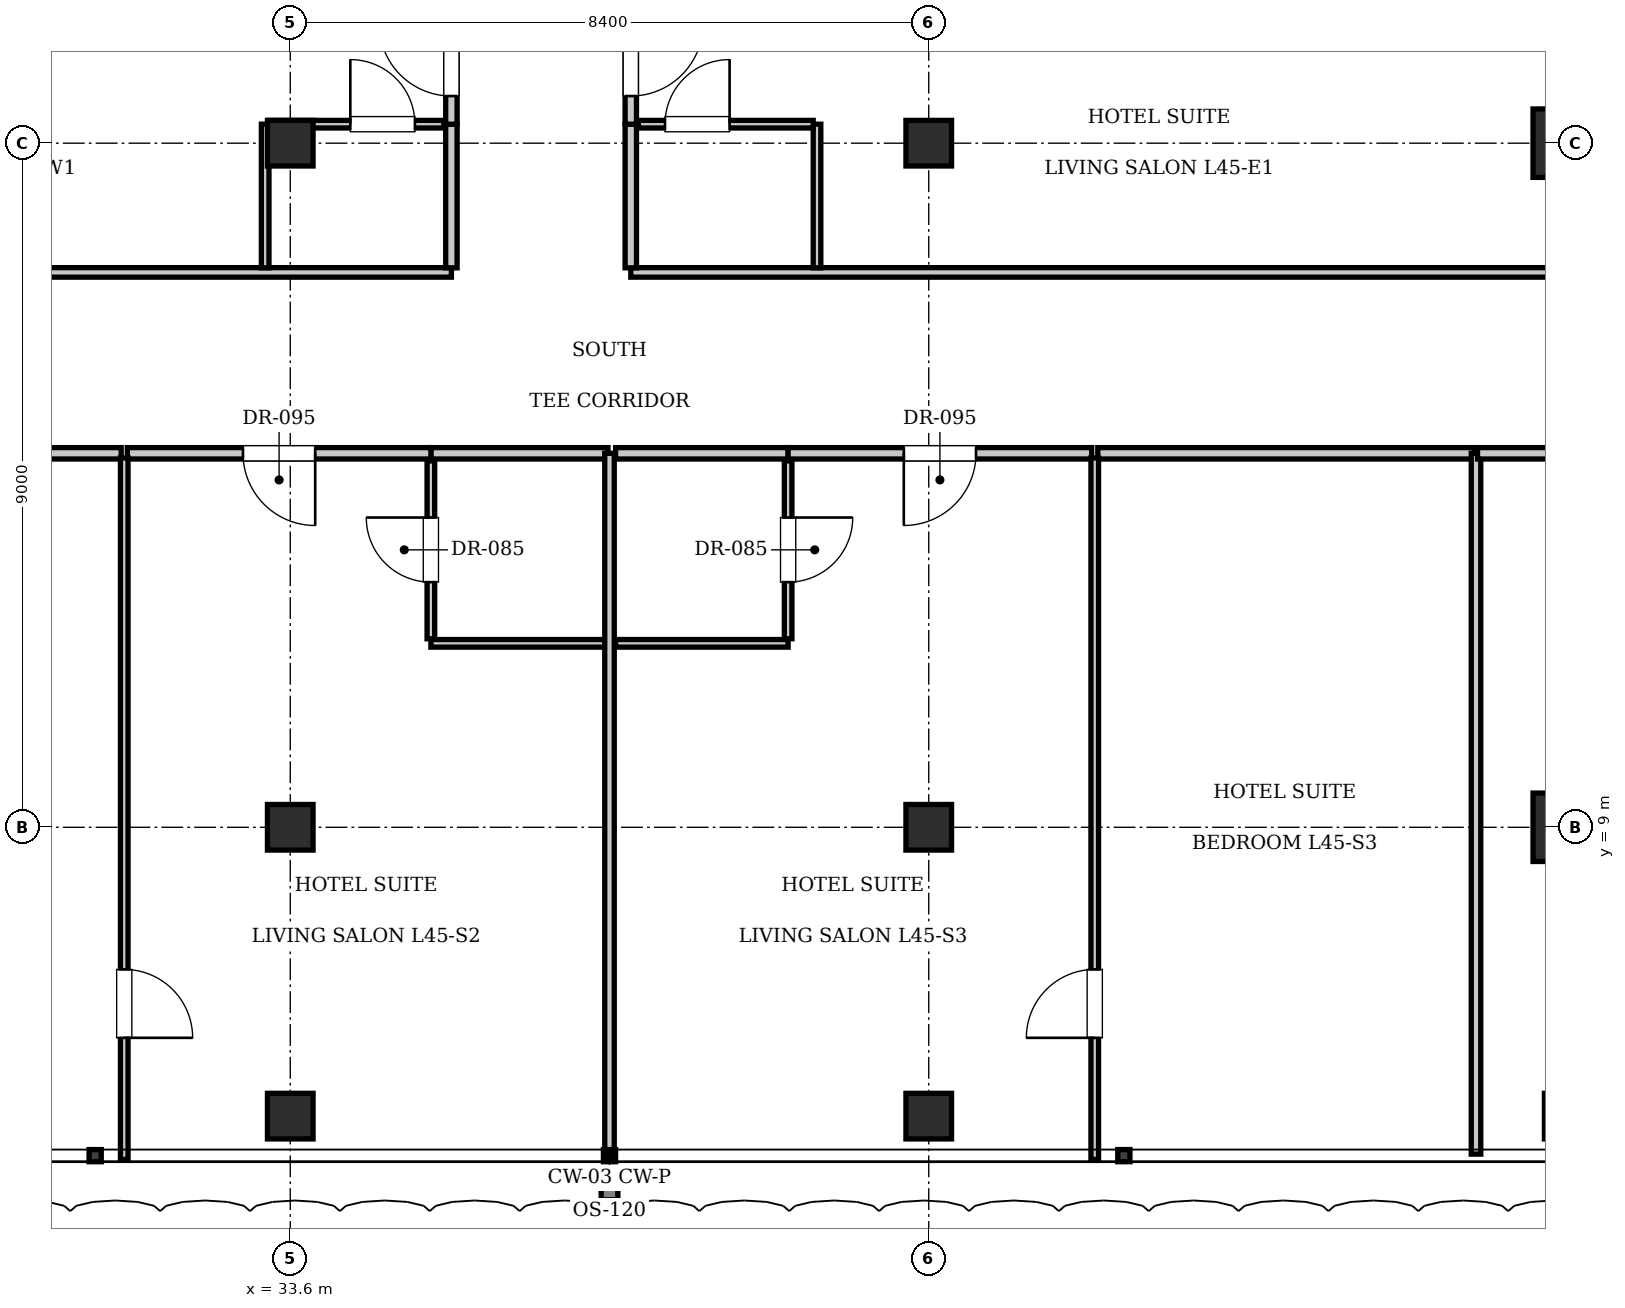
"""IFC4 building model, lengths in metres.
Left out: names, types, materials, properties, quantities, classifications, styles, units other than length and angle.
Written with IfcOpenShell. Run it as: python <this file> out.ifc"""

import sys

from ifc_helpers import new_model, si_unit, direction, frame, frame_2d, origin, origin_2d, place, context, subcontext, project, spatial, rectangle, i_section, extrude, element, fill, save


model = new_model("IFC4")
c1 = context("Model", 3, precision=1e-05, world=origin(), true_north=direction((0.0, 1.0)))
c2 = subcontext(c1, "Body", "Model", "MODEL_VIEW")
j1 = project(units=[si_unit("LENGTHUNIT", "METRE"), si_unit("PLANEANGLEUNIT", "RADIAN")], contexts=[c1])
p1 = place(None, origin())
s1 = spatial("IfcSite", under=j1, at=p1, CompositionType="ELEMENT")
p2 = place(p1, origin())
s2 = spatial("IfcBuilding", under=s1, at=p2, CompositionType="ELEMENT")
p3 = place(p2, frame((0.0, 0.0, 185.15)))
s3 = spatial("IfcBuildingStorey", under=s2, at=p3, CompositionType="ELEMENT", Elevation=185.15)
for number, where, z_axis, x_axis in (
    (1, (50.4, 18.0, 0.0), (0.0, 0.0, 1.0), (1.0, 0.0, 0.0)),
    (2, (50.4, 9.0, 0.0), (0.0, 0.0, 1.0), (1.0, 0.0, 0.0)),
):
    element("IfcColumn", number, at=place(p3, frame(where, z_axis=z_axis, x_axis=x_axis)), inside=s3, PredefinedType="COLUMN", context=c2, shape_type="SweptSolid", body=[
        extrude(rectangle(XDim=0.9, YDim=0.9, at=origin_2d()), origin(), (0.0, 0.0, 1.0), 3.85),
    ])
for number, where, z_axis, x_axis in (
    (3, (33.6, 9.0, 0.0), (0.0, 0.0, 1.0), (1.0, 0.0, 0.0)),
    (4, (42.0, 9.0, 0.0), (0.0, 0.0, 1.0), (1.0, 0.0, 0.0)),
    (5, (33.6, 18.0, 0.0), (0.0, 0.0, 1.0), (1.0, 0.0, 0.0)),
    (6, (42.0, 18.0, 0.0), (0.0, 0.0, 1.0), (1.0, 0.0, 0.0)),
    (7, (33.6, 5.2, 0.0), (0.0, 0.0, 1.0), (1.0, 0.0, 0.0)),
    (8, (42.0, 5.2, 0.0), (0.0, 0.0, 1.0), (1.0, 0.0, 0.0)),
    (9, (50.4, 5.2, 0.0), (0.0, 0.0, 1.0), (1.0, 0.0, 0.0)),
):
    element("IfcColumn", number, at=place(p3, frame(where, z_axis=z_axis, x_axis=x_axis)), inside=s3, PredefinedType="COLUMN", context=c2, shape_type="SweptSolid", body=[
        extrude(i_section(OverallWidth=0.6, OverallDepth=0.6, WebThickness=0.025, FlangeThickness=0.038, at=origin_2d()), origin(), (0.0, 0.0, 1.0), 3.85),
    ])
p4 = place(p3, frame((35.45, 13.92, 0.0), z_axis=(0.0, 0.0, 1.0), x_axis=(1.0, 0.0, 0.0)))
e10 = element("IfcWall", 10, at=p4, inside=s3, PredefinedType="PARTITIONING", context=c2, shape_type="SweptSolid", body=[
    extrude(rectangle(XDim=2.33, YDim=0.15, at=frame_2d((1.165, 0.0))), origin(), (0.0, 0.0, 1.0), 3.61),
])
p5 = place(p3, frame((35.45, 11.42, 0.0), z_axis=(0.0, 0.0, 1.0), x_axis=(1.0, 0.0, 0.0)))
e11 = element("IfcWall", 11, at=p5, inside=s3, PredefinedType="PARTITIONING", context=c2, shape_type="SweptSolid", body=[
    extrude(rectangle(XDim=2.31, YDim=0.1, at=frame_2d((1.155, 0.0))), origin(), (0.0, 0.0, 1.0), 3.61),
])
p6 = place(p3, frame((35.45, 11.48, 0.0), z_axis=(0.0, 0.0, 1.0), x_axis=(0.0, 1.0, 0.0)))
e12 = element("IfcWall", 12, at=p6, inside=s3, PredefinedType="PARTITIONING", context=c2, shape_type="SweptSolid", body=[
    extrude(rectangle(XDim=2.34, YDim=0.1, at=frame_2d((1.17, 0.0))), origin(), (0.0, 0.0, 1.0), 3.61),
])
p7 = place(p6, frame((0.745, 0.0, 0.0)))
e13 = element("IfcOpeningElement", 13, at=p7, cuts=e12, PredefinedType="OPENING", context=c2, shape_type="SweptSolid", body=[
    extrude(rectangle(XDim=0.85, YDim=2.1, at=frame_2d((0.425, 1.05))), frame((0.0, 0.06, 0.0), z_axis=(0.0, -1.0, 0.0), x_axis=(1.0, 0.0, 0.0)), (0.0, 0.0, 1.0), 0.12),
])
p8 = place(p3, frame((26.42, 13.92, 0.0), z_axis=(0.0, 0.0, 1.0), x_axis=(1.0, 0.0, 0.0)))
e14 = element("IfcWall", 14, at=p8, inside=s3, PredefinedType="PARTITIONING", context=c2, shape_type="SweptSolid", body=[
    extrude(rectangle(XDim=4.956, YDim=0.15, at=frame_2d((2.478, 0.0))), origin(), (0.0, 0.0, 1.0), 3.61),
])
p9 = place(p3, frame((31.456, 13.92, 0.0), z_axis=(0.0, 0.0, 1.0), x_axis=(1.0, 0.0, 0.0)))
e15 = element("IfcWall", 15, at=p9, inside=s3, PredefinedType="PARTITIONING", context=c2, shape_type="SweptSolid", body=[
    extrude(rectangle(XDim=3.994, YDim=0.15, at=frame_2d((1.997, 0.0))), origin(), (0.0, 0.0, 1.0), 3.61),
])
p10 = place(p9, frame((1.522, 0.0, 0.0)))
e16 = element("IfcOpeningElement", 16, at=p10, cuts=e15, PredefinedType="OPENING", context=c2, shape_type="SweptSolid", body=[
    extrude(rectangle(XDim=0.95, YDim=2.15, at=frame_2d((0.475, 1.075))), frame((0.0, 0.085, 0.0), z_axis=(0.0, -1.0, 0.0), x_axis=(1.0, 0.0, 0.0)), (0.0, 0.0, 1.0), 0.17),
])
p11 = place(p3, frame((31.416, 4.63, 0.0), z_axis=(0.0, 0.0, 1.0), x_axis=(0.0, 1.0, 0.0)))
e17 = element("IfcWall", 17, at=p11, inside=s3, PredefinedType="PARTITIONING", context=c2, shape_type="SweptSolid", body=[
    extrude(rectangle(XDim=9.23, YDim=0.1, at=frame_2d((4.615, 0.0))), origin(), (0.0, 0.0, 1.0), 3.61),
])
p12 = place(p11, frame((1.6, 0.0, 0.0)))
e18 = element("IfcOpeningElement", 18, at=p12, cuts=e17, PredefinedType="OPENING", context=c2, shape_type="SweptSolid", body=[
    extrude(rectangle(XDim=0.9, YDim=2.1, at=frame_2d((0.45, 1.05))), frame((0.0, 0.06, 0.0), z_axis=(0.0, -1.0, 0.0), x_axis=(1.0, 0.0, 0.0)), (0.0, 0.0, 1.0), 0.12),
])
p13 = place(p3, frame((37.8, 4.7, 0.0), z_axis=(0.0, 0.0, 1.0), x_axis=(0.0, 1.0, 0.0)))
e19 = element("IfcWall", 19, at=p13, inside=s3, PredefinedType="PARTITIONING", context=c2, shape_type="SweptSolid", body=[
    extrude(rectangle(XDim=9.22, YDim=0.125, at=frame_2d((4.61, 0.0))), origin(), (0.0, 0.0, 1.0), 3.293),
])
p14 = place(p3, frame((37.88, 13.92, 0.0), z_axis=(0.0, 0.0, 1.0), x_axis=(1.0, 0.0, 0.0)))
e20 = element("IfcWall", 20, at=p14, inside=s3, PredefinedType="PARTITIONING", context=c2, shape_type="SweptSolid", body=[
    extrude(rectangle(XDim=2.27, YDim=0.15, at=frame_2d((1.135, 0.0))), origin(), (0.0, 0.0, 1.0), 3.61),
])
p15 = place(p3, frame((37.88, 11.42, 0.0), z_axis=(0.0, 0.0, 1.0), x_axis=(1.0, 0.0, 0.0)))
e21 = element("IfcWall", 21, at=p15, inside=s3, PredefinedType="PARTITIONING", context=c2, shape_type="SweptSolid", body=[
    extrude(rectangle(XDim=2.27, YDim=0.1, at=frame_2d((1.135, 0.0))), origin(), (0.0, 0.0, 1.0), 3.61),
])
p16 = place(p3, frame((40.15, 11.48, 0.0), z_axis=(0.0, 0.0, 1.0), x_axis=(0.0, 1.0, 0.0)))
e22 = element("IfcWall", 22, at=p16, inside=s3, PredefinedType="PARTITIONING", context=c2, shape_type="SweptSolid", body=[
    extrude(rectangle(XDim=2.34, YDim=0.1, at=frame_2d((1.17, 0.0))), origin(), (0.0, 0.0, 1.0), 3.61),
])
p17 = place(p16, frame((0.745, 0.0, 0.0)))
e23 = element("IfcOpeningElement", 23, at=p17, cuts=e22, PredefinedType="OPENING", context=c2, shape_type="SweptSolid", body=[
    extrude(rectangle(XDim=0.85, YDim=2.1, at=frame_2d((0.425, 1.05))), frame((0.0, 0.06, 0.0), z_axis=(0.0, -1.0, 0.0), x_axis=(1.0, 0.0, 0.0)), (0.0, 0.0, 1.0), 0.12),
])
p18 = place(p3, frame((40.15, 13.92, 0.0), z_axis=(0.0, 0.0, 1.0), x_axis=(1.0, 0.0, 0.0)))
e24 = element("IfcWall", 24, at=p18, inside=s3, PredefinedType="PARTITIONING", context=c2, shape_type="SweptSolid", body=[
    extrude(rectangle(XDim=3.994, YDim=0.15, at=frame_2d((1.997, 0.0))), origin(), (0.0, 0.0, 1.0), 3.61),
])
p19 = place(p18, frame((1.522, 0.0, 0.0)))
e25 = element("IfcOpeningElement", 25, at=p19, cuts=e24, PredefinedType="OPENING", context=c2, shape_type="SweptSolid", body=[
    extrude(rectangle(XDim=0.95, YDim=2.15, at=frame_2d((0.475, 1.075))), frame((0.0, 0.085, 0.0), z_axis=(0.0, -1.0, 0.0), x_axis=(1.0, 0.0, 0.0)), (0.0, 0.0, 1.0), 0.17),
])
p20 = place(p3, frame((44.224, 13.92, 0.0), z_axis=(0.0, 0.0, 1.0), x_axis=(1.0, 0.0, 0.0)))
e26 = element("IfcWall", 26, at=p20, inside=s3, PredefinedType="PARTITIONING", context=c2, shape_type="SweptSolid", body=[
    extrude(rectangle(XDim=4.956, YDim=0.15, at=frame_2d((2.478, 0.0))), origin(), (0.0, 0.0, 1.0), 3.61),
])
p21 = place(p3, frame((44.184, 4.63, 0.0), z_axis=(0.0, 0.0, 1.0), x_axis=(0.0, 1.0, 0.0)))
e27 = element("IfcWall", 27, at=p21, inside=s3, PredefinedType="PARTITIONING", context=c2, shape_type="SweptSolid", body=[
    extrude(rectangle(XDim=9.23, YDim=0.1, at=frame_2d((4.615, 0.0))), origin(), (0.0, 0.0, 1.0), 3.61),
])
p22 = place(p21, frame((1.6, 0.0, 0.0)))
e28 = element("IfcOpeningElement", 28, at=p22, cuts=e27, PredefinedType="OPENING", context=c2, shape_type="SweptSolid", body=[
    extrude(rectangle(XDim=0.9, YDim=2.1, at=frame_2d((0.45, 1.05))), frame((0.0, 0.06, 0.0), z_axis=(0.0, -1.0, 0.0), x_axis=(1.0, 0.0, 0.0)), (0.0, 0.0, 1.0), 0.12),
])
p23 = place(p3, frame((49.2, 4.7, 0.0), z_axis=(0.0, 0.0, 1.0), x_axis=(0.0, 1.0, 0.0)))
e29 = element("IfcWall", 29, at=p23, inside=s3, PredefinedType="PARTITIONING", context=c2, shape_type="SweptSolid", body=[
    extrude(rectangle(XDim=9.22, YDim=0.125, at=frame_2d((4.61, 0.0))), origin(), (0.0, 0.0, 1.0), 3.61),
])
p24 = place(p3, frame((49.22, 13.92, 0.0), z_axis=(0.0, 0.0, 1.0), x_axis=(1.0, 0.0, 0.0)))
e30 = element("IfcWall", 30, at=p24, inside=s3, PredefinedType="PARTITIONING", context=c2, shape_type="SweptSolid", body=[
    extrude(rectangle(XDim=3.856, YDim=0.15, at=frame_2d((1.928, 0.0))), origin(), (0.0, 0.0, 1.0), 3.61),
])
p25 = place(p3, frame((13.2, 16.3, 0.0), z_axis=(0.0, 0.0, 1.0), x_axis=(1.0, 0.0, 0.0)))
e31 = element("IfcWall", 31, at=p25, inside=s3, PredefinedType="PARTITIONING", context=c2, shape_type="SweptSolid", body=[
    extrude(rectangle(XDim=22.52, YDim=0.125, at=frame_2d((11.26, 0.0))), origin(), (0.0, 0.0, 1.0), 3.61),
])
p26 = place(p3, frame((38.08, 16.3, 0.0), z_axis=(0.0, 0.0, 1.0), x_axis=(1.0, 0.0, 0.0)))
e32 = element("IfcWall", 32, at=p26, inside=s3, PredefinedType="PARTITIONING", context=c2, shape_type="SweptSolid", body=[
    extrude(rectangle(XDim=24.32, YDim=0.125, at=frame_2d((12.16, 0.0))), origin(), (0.0, 0.0, 1.0), 3.61),
])
p27 = place(p3, frame((35.72, 16.36, 0.0), z_axis=(0.0, 0.0, 1.0), x_axis=(0.0, 1.0, 0.0)))
e33 = element("IfcWall", 33, at=p27, inside=s3, PredefinedType="PARTITIONING", context=c2, shape_type="SweptSolid", body=[
    extrude(rectangle(XDim=1.89, YDim=0.15, at=frame_2d((0.945, 0.0))), origin(), (0.0, 0.0, 1.0), 3.61),
])
p28 = place(p3, frame((35.72, 18.25, 0.0), z_axis=(0.0, 0.0, 1.0), x_axis=(0.0, 1.0, 0.0)))
e34 = element("IfcWall", 34, at=p28, inside=s3, PredefinedType="PARTITIONING", context=c2, shape_type="SweptSolid", body=[
    extrude(rectangle(XDim=1.69, YDim=0.15, at=frame_2d((0.845, 0.0))), origin(), (0.0, 0.0, 1.0), 3.61),
])
p29 = place(p28, frame((0.37, 0.0, 0.0)))
e35 = element("IfcOpeningElement", 35, at=p29, cuts=e34, PredefinedType="OPENING", context=c2, shape_type="SweptSolid", body=[
    extrude(rectangle(XDim=0.95, YDim=2.15, at=frame_2d((0.475, 1.075))), frame((0.0, 0.085, 0.0), z_axis=(0.0, -1.0, 0.0), x_axis=(1.0, 0.0, 0.0)), (0.0, 0.0, 1.0), 0.17),
])
p30 = place(p3, frame((33.27, 16.36, 0.0), z_axis=(0.0, 0.0, 1.0), x_axis=(0.0, 1.0, 0.0)))
e36 = element("IfcWall", 36, at=p30, inside=s3, PredefinedType="PARTITIONING", context=c2, shape_type="SweptSolid", body=[
    extrude(rectangle(XDim=1.89, YDim=0.1, at=frame_2d((0.945, 0.0))), origin(), (0.0, 0.0, 1.0), 3.61),
])
p31 = place(p3, frame((33.32, 18.25, 0.0), z_axis=(0.0, 0.0, 1.0), x_axis=(1.0, 0.0, 0.0)))
e37 = element("IfcWall", 37, at=p31, inside=s3, PredefinedType="PARTITIONING", context=c2, shape_type="SweptSolid", body=[
    extrude(rectangle(XDim=2.3, YDim=0.1, at=frame_2d((1.15, 0.0))), origin(), (0.0, 0.0, 1.0), 3.61),
])
p32 = place(p31, frame((1.07, 0.0, 0.0)))
e38 = element("IfcOpeningElement", 38, at=p32, cuts=e37, PredefinedType="OPENING", context=c2, shape_type="SweptSolid", body=[
    extrude(rectangle(XDim=0.85, YDim=2.1, at=frame_2d((0.425, 1.05))), frame((0.0, 0.06, 0.0), z_axis=(0.0, -1.0, 0.0), x_axis=(1.0, 0.0, 0.0)), (0.0, 0.0, 1.0), 0.12),
])
p33 = place(p3, frame((38.08, 16.36, 0.0), z_axis=(0.0, 0.0, 1.0), x_axis=(0.0, 1.0, 0.0)))
e39 = element("IfcWall", 39, at=p33, inside=s3, PredefinedType="PARTITIONING", context=c2, shape_type="SweptSolid", body=[
    extrude(rectangle(XDim=1.89, YDim=0.15, at=frame_2d((0.945, 0.0))), origin(), (0.0, 0.0, 1.0), 3.61),
])
p34 = place(p3, frame((38.08, 18.25, 0.0), z_axis=(0.0, 0.0, 1.0), x_axis=(0.0, 1.0, 0.0)))
e40 = element("IfcWall", 40, at=p34, inside=s3, PredefinedType="PARTITIONING", context=c2, shape_type="SweptSolid", body=[
    extrude(rectangle(XDim=1.69, YDim=0.15, at=frame_2d((0.845, 0.0))), origin(), (0.0, 0.0, 1.0), 3.61),
])
p35 = place(p34, frame((0.37, 0.0, 0.0)))
e41 = element("IfcOpeningElement", 41, at=p35, cuts=e40, PredefinedType="OPENING", context=c2, shape_type="SweptSolid", body=[
    extrude(rectangle(XDim=0.95, YDim=2.15, at=frame_2d((0.475, 1.075))), frame((0.0, 0.085, 0.0), z_axis=(0.0, -1.0, 0.0), x_axis=(1.0, 0.0, 0.0)), (0.0, 0.0, 1.0), 0.17),
])
p36 = place(p3, frame((40.53, 16.36, 0.0), z_axis=(0.0, 0.0, 1.0), x_axis=(0.0, 1.0, 0.0)))
e42 = element("IfcWall", 42, at=p36, inside=s3, PredefinedType="PARTITIONING", context=c2, shape_type="SweptSolid", body=[
    extrude(rectangle(XDim=1.89, YDim=0.1, at=frame_2d((0.945, 0.0))), origin(), (0.0, 0.0, 1.0), 3.61),
])
p37 = place(p3, frame((38.18, 18.25, 0.0), z_axis=(0.0, 0.0, 1.0), x_axis=(1.0, 0.0, 0.0)))
e43 = element("IfcWall", 43, at=p37, inside=s3, PredefinedType="PARTITIONING", context=c2, shape_type="SweptSolid", body=[
    extrude(rectangle(XDim=2.3, YDim=0.1, at=frame_2d((1.15, 0.0))), origin(), (0.0, 0.0, 1.0), 3.61),
])
p38 = place(p37, frame((0.35, 0.0, 0.0)))
e44 = element("IfcOpeningElement", 44, at=p38, cuts=e43, PredefinedType="OPENING", context=c2, shape_type="SweptSolid", body=[
    extrude(rectangle(XDim=0.85, YDim=2.1, at=frame_2d((0.425, 1.05))), frame((0.0, 0.06, 0.0), z_axis=(0.0, -1.0, 0.0), x_axis=(1.0, 0.0, 0.0)), (0.0, 0.0, 1.0), 0.12),
])
p39 = place(p7, origin())
e45 = element("IfcDoor", 45, at=p39, inside=s3, OperationType="SINGLE_SWING_RIGHT", PredefinedType="DOOR", context=c2, shape_type="SweptSolid", body=[
    extrude(rectangle(XDim=0.85, YDim=2.1, at=frame_2d((0.425, 1.05))), frame((0.0, 0.025, 0.0), z_axis=(0.0, -1.0, 0.0), x_axis=(1.0, 0.0, 0.0)), (0.0, 0.0, 1.0), 0.05),
])
fill(e13, e45)
p40 = place(p10, frame((0.95, 0.0, 0.0), z_axis=(0.0, 0.0, 1.0), x_axis=(-1.0, 0.0, 0.0)))
e46 = element("IfcDoor", 46, at=p40, inside=s3, OperationType="SINGLE_SWING_LEFT", PredefinedType="DOOR", context=c2, shape_type="SweptSolid", body=[
    extrude(rectangle(XDim=0.95, YDim=2.15, at=frame_2d((0.475, 1.075))), frame((0.0, 0.025, 0.0), z_axis=(0.0, -1.0, 0.0), x_axis=(1.0, 0.0, 0.0)), (0.0, 0.0, 1.0), 0.05),
])
fill(e16, e46)
p41 = place(p12, frame((0.9, 0.0, 0.0), z_axis=(0.0, 0.0, 1.0), x_axis=(-1.0, 0.0, 0.0)))
e47 = element("IfcDoor", 47, at=p41, inside=s3, OperationType="SINGLE_SWING_RIGHT", PredefinedType="DOOR", context=c2, shape_type="SweptSolid", body=[
    extrude(rectangle(XDim=0.9, YDim=2.1, at=frame_2d((0.45, 1.05))), frame((0.0, 0.025, 0.0), z_axis=(0.0, -1.0, 0.0), x_axis=(1.0, 0.0, 0.0)), (0.0, 0.0, 1.0), 0.05),
])
fill(e18, e47)
p42 = place(p17, frame((0.85, 0.0, 0.0), z_axis=(0.0, 0.0, 1.0), x_axis=(-1.0, 0.0, 0.0)))
e48 = element("IfcDoor", 48, at=p42, inside=s3, OperationType="SINGLE_SWING_LEFT", PredefinedType="DOOR", context=c2, shape_type="SweptSolid", body=[
    extrude(rectangle(XDim=0.85, YDim=2.1, at=frame_2d((0.425, 1.05))), frame((0.0, 0.025, 0.0), z_axis=(0.0, -1.0, 0.0), x_axis=(1.0, 0.0, 0.0)), (0.0, 0.0, 1.0), 0.05),
])
fill(e23, e48)
p43 = place(p19, frame((0.95, 0.0, 0.0), z_axis=(0.0, 0.0, 1.0), x_axis=(-1.0, 0.0, 0.0)))
e49 = element("IfcDoor", 49, at=p43, inside=s3, OperationType="SINGLE_SWING_RIGHT", PredefinedType="DOOR", context=c2, shape_type="SweptSolid", body=[
    extrude(rectangle(XDim=0.95, YDim=2.15, at=frame_2d((0.475, 1.075))), frame((0.0, 0.025, 0.0), z_axis=(0.0, -1.0, 0.0), x_axis=(1.0, 0.0, 0.0)), (0.0, 0.0, 1.0), 0.05),
])
fill(e25, e49)
p44 = place(p22, origin())
e50 = element("IfcDoor", 50, at=p44, inside=s3, OperationType="SINGLE_SWING_LEFT", PredefinedType="DOOR", context=c2, shape_type="SweptSolid", body=[
    extrude(rectangle(XDim=0.9, YDim=2.1, at=frame_2d((0.45, 1.05))), frame((0.0, 0.025, 0.0), z_axis=(0.0, -1.0, 0.0), x_axis=(1.0, 0.0, 0.0)), (0.0, 0.0, 1.0), 0.05),
])
fill(e28, e50)
p45 = place(p32, origin())
e51 = element("IfcDoor", 51, at=p45, inside=s3, OperationType="SINGLE_SWING_LEFT", PredefinedType="DOOR", context=c2, shape_type="SweptSolid", body=[
    extrude(rectangle(XDim=0.85, YDim=2.1, at=frame_2d((0.425, 1.05))), frame((0.0, 0.025, 0.0), z_axis=(0.0, -1.0, 0.0), x_axis=(1.0, 0.0, 0.0)), (0.0, 0.0, 1.0), 0.05),
])
fill(e38, e51)
p46 = place(p29, origin())
e52 = element("IfcDoor", 52, at=p46, inside=s3, OperationType="SINGLE_SWING_RIGHT", PredefinedType="DOOR", context=c2, shape_type="SweptSolid", body=[
    extrude(rectangle(XDim=0.95, YDim=2.15, at=frame_2d((0.475, 1.075))), frame((0.0, 0.025, 0.0), z_axis=(0.0, -1.0, 0.0), x_axis=(1.0, 0.0, 0.0)), (0.0, 0.0, 1.0), 0.05),
])
fill(e35, e52)
p47 = place(p38, origin())
e53 = element("IfcDoor", 53, at=p47, inside=s3, OperationType="SINGLE_SWING_RIGHT", PredefinedType="DOOR", context=c2, shape_type="SweptSolid", body=[
    extrude(rectangle(XDim=0.85, YDim=2.1, at=frame_2d((0.425, 1.05))), frame((0.0, 0.025, 0.0), z_axis=(0.0, -1.0, 0.0), x_axis=(1.0, 0.0, 0.0)), (0.0, 0.0, 1.0), 0.05),
])
fill(e44, e53)
p48 = place(p35, frame((0.95, 0.0, 0.0), z_axis=(0.0, 0.0, 1.0), x_axis=(-1.0, 0.0, 0.0)))
e54 = element("IfcDoor", 54, at=p48, inside=s3, OperationType="SINGLE_SWING_LEFT", PredefinedType="DOOR", context=c2, shape_type="SweptSolid", body=[
    extrude(rectangle(XDim=0.95, YDim=2.15, at=frame_2d((0.475, 1.075))), frame((0.0, 0.025, 0.0), z_axis=(0.0, -1.0, 0.0), x_axis=(1.0, 0.0, 0.0)), (0.0, 0.0, 1.0), 0.05),
])
fill(e41, e54)
save(model, sys.argv[1])
